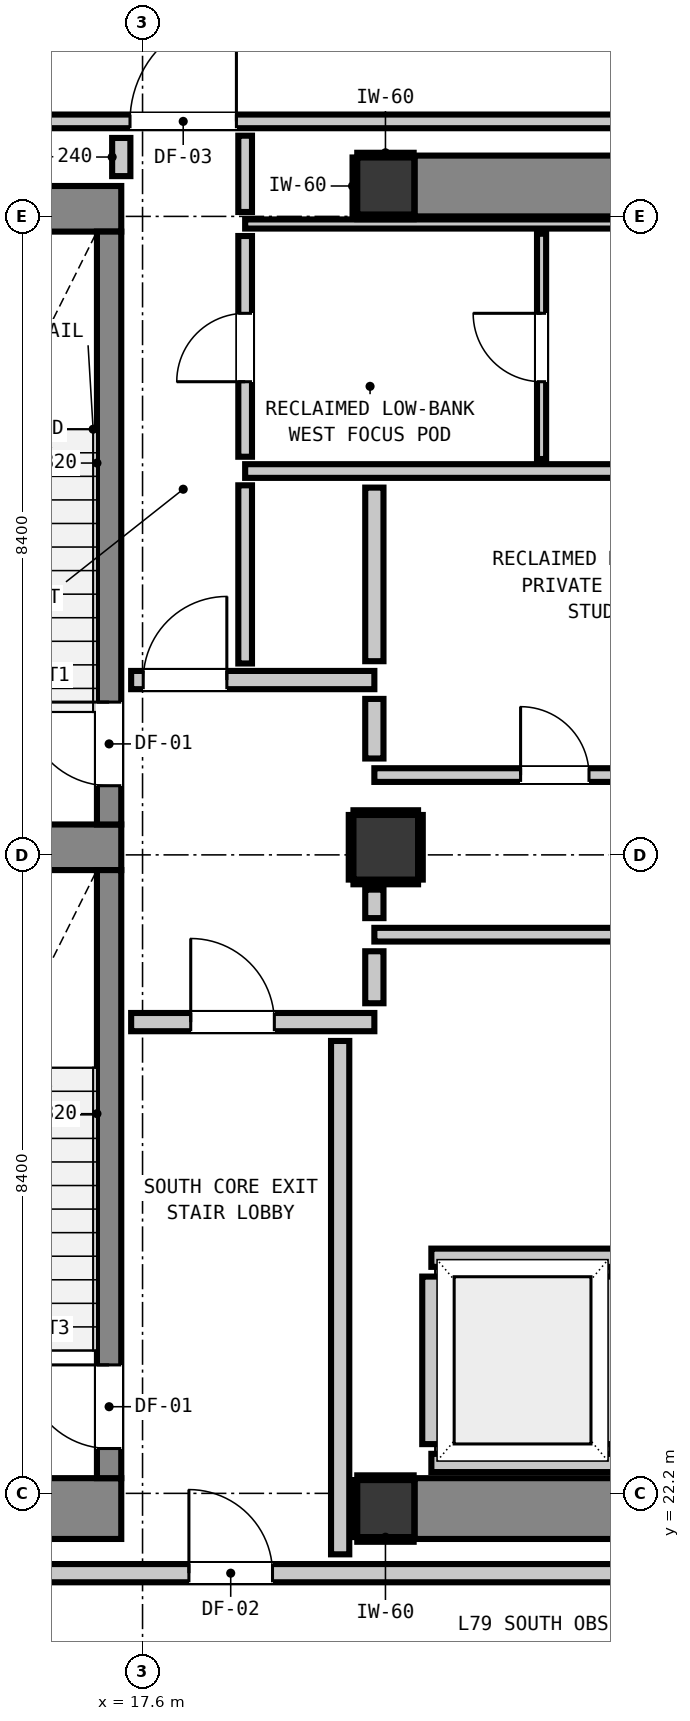
"""IFC4 building model, lengths in metres.
Left out: names, types, materials, properties, quantities, classifications, styles, units other than length and angle.
Written with IfcOpenShell. Run it as: python <this file> out.ifc"""

import sys

from ifc_helpers import new_model, si_unit, direction, frame, frame_2d, origin, origin_2d, place, context, subcontext, project, spatial, rectangle, extrude, element, fill, save


model = new_model("IFC4")
c1 = context("Model", 3, precision=1e-05, world=origin(), true_north=direction((0.0, 1.0)))
c2 = subcontext(c1, "Body", "Model", "MODEL_VIEW")
j1 = project(units=[si_unit("LENGTHUNIT", "METRE"), si_unit("PLANEANGLEUNIT", "RADIAN")], contexts=[c1])
p1 = place(None, origin())
s1 = spatial("IfcSite", under=j1, at=p1, CompositionType="ELEMENT")
p2 = place(p1, origin())
s2 = spatial("IfcBuilding", under=s1, at=p2, CompositionType="ELEMENT")
p3 = place(p2, frame((0.0, 0.0, 273.48)))
s3 = spatial("IfcBuildingStorey", under=s2, at=p3, CompositionType="ELEMENT", Elevation=273.48)
for number, where, z_axis, x_axis in (
    (1, (20.8, 22.0, 0.0), (0.0, 0.0, 1.0), (1.0, 0.0, 0.0)),
    (2, (20.8, 39.4, 0.0), (0.0, 0.0, 1.0), (1.0, 0.0, 0.0)),
):
    element("IfcColumn", number, at=place(p3, frame(where, z_axis=z_axis, x_axis=x_axis)), inside=s3, PredefinedType="COLUMN", context=c2, shape_type="SweptSolid", body=[
        extrude(rectangle(XDim=0.75, YDim=0.75, at=origin_2d()), origin(), (0.0, 0.0, 1.0), 4.18),
    ])
p4 = place(p3, frame((13.24, 22.0, 0.0), z_axis=(0.0, 0.0, 1.0), x_axis=(1.0, 0.0, 0.0)))
e3 = element("IfcWall", 3, at=p4, inside=s3, PredefinedType="SHEAR", context=c2, shape_type="SweptSolid", body=[
    extrude(rectangle(XDim=4.08, YDim=0.8, at=frame_2d((2.04, 0.0))), origin(), (0.0, 0.0, 1.0), 4.6),
])
p5 = place(p3, frame((13.24, 39.1, 0.0), z_axis=(0.0, 0.0, 1.0), x_axis=(1.0, 0.0, 0.0)))
e4 = element("IfcWall", 4, at=p5, inside=s3, PredefinedType="SHEAR", context=c2, shape_type="SweptSolid", body=[
    extrude(rectangle(XDim=4.08, YDim=0.6, at=frame_2d((2.04, 0.0))), origin(), (0.0, 0.0, 1.0), 4.6),
])
p6 = place(p3, frame((13.78, 30.7, 0.0), z_axis=(0.0, 0.0, 1.0), x_axis=(1.0, 0.0, 0.0)))
e5 = element("IfcWall", 5, at=p6, inside=s3, PredefinedType="SHEAR", context=c2, shape_type="SweptSolid", body=[
    extrude(rectangle(XDim=3.54, YDim=0.6, at=frame_2d((1.77, 0.0))), origin(), (0.0, 0.0, 1.0), 4.6),
])
for number, where, z_axis, x_axis in (
    (6, (21.18, 22.0, 0.0), (0.0, 0.0, 1.0), (1.0, 0.0, 0.0)),
    (7, (21.18, 39.4, 0.0), (0.0, 0.0, 1.0), (1.0, 0.0, 0.0)),
):
    element("IfcWall", number, at=place(p3, frame(where, z_axis=z_axis, x_axis=x_axis)), inside=s3, PredefinedType="SHEAR", context=c2, shape_type="SweptSolid", body=[
        extrude(rectangle(XDim=7.64, YDim=0.8, at=frame_2d((3.82, 0.0))), origin(), (0.0, 0.0, 1.0), 4.6),
    ])
p7 = place(p3, frame((17.16, 31.0, 0.0), z_axis=(0.0, 0.0, 1.0), x_axis=(0.0, 1.0, 0.0)))
e8 = element("IfcWall", 8, at=p7, inside=s3, PredefinedType="SHEAR", context=c2, shape_type="SweptSolid", body=[
    extrude(rectangle(XDim=7.8, YDim=0.32, at=frame_2d((3.9, 0.0))), origin(), (0.0, 0.0, 1.0), 4.6),
])
p8 = place(p7, frame((0.51, 0.0, 0.0)))
e9 = element("IfcOpeningElement", 9, at=p8, cuts=e8, PredefinedType="OPENING", context=c2, shape_type="SweptSolid", body=[
    extrude(rectangle(XDim=1.1, YDim=2.15, at=frame_2d((0.55, 1.075))), frame((0.0, 0.17, 0.0), z_axis=(0.0, -1.0, 0.0), x_axis=(1.0, 0.0, 0.0)), (0.0, 0.0, 1.0), 0.34),
])
p9 = place(p3, frame((17.16, 22.4, 0.0), z_axis=(0.0, 0.0, 1.0), x_axis=(0.0, 1.0, 0.0)))
e10 = element("IfcWall", 10, at=p9, inside=s3, PredefinedType="SHEAR", context=c2, shape_type="SweptSolid", body=[
    extrude(rectangle(XDim=8.0, YDim=0.32, at=frame_2d((4.0, 0.0))), origin(), (0.0, 0.0, 1.0), 4.6),
])
p10 = place(p9, frame((0.39, 0.0, 0.0)))
e11 = element("IfcOpeningElement", 11, at=p10, cuts=e10, PredefinedType="OPENING", context=c2, shape_type="SweptSolid", body=[
    extrude(rectangle(XDim=1.1, YDim=2.15, at=frame_2d((0.55, 1.075))), frame((0.0, 0.17, 0.0), z_axis=(0.0, -1.0, 0.0), x_axis=(1.0, 0.0, 0.0)), (0.0, 0.0, 1.0), 0.34),
])
p11 = place(p3, frame((20.8, 30.7, 0.0), z_axis=(0.0, 0.0, 1.0), x_axis=(1.0, 0.0, 0.0)))
e12 = element("IfcColumn", 12, at=p11, inside=s3, PredefinedType="COLUMN", context=c2, shape_type="SweptSolid", body=[
    extrude(rectangle(XDim=0.85, YDim=0.85, at=origin_2d()), origin(), (0.0, 0.0, 1.0), 4.6),
])
p12 = place(p3, frame((21.4, 22.6, 0.0), z_axis=(0.0, 0.0, 1.0), x_axis=(1.0, 0.0, 0.0)))
e13 = element("IfcWall", 13, at=p12, inside=s3, PredefinedType="PARTITIONING", context=c2, shape_type="SweptSolid", body=[
    extrude(rectangle(XDim=2.4, YDim=0.24, at=frame_2d((1.2, 0.0))), origin(), (0.0, 0.0, 1.0), 1.965),
])
p13 = place(p3, frame((21.4, 25.3, 0.0), z_axis=(0.0, 0.0, 1.0), x_axis=(1.0, 0.0, 0.0)))
e14 = element("IfcWall", 14, at=p13, inside=s3, PredefinedType="PARTITIONING", context=c2, shape_type="SweptSolid", body=[
    extrude(rectangle(XDim=2.4, YDim=0.24, at=frame_2d((1.2, 0.0))), origin(), (0.0, 0.0, 1.0), 4.18),
])
p14 = place(p3, frame((21.4, 22.848, 0.0), z_axis=(0.0, 0.0, 1.0), x_axis=(0.0, 1.0, 0.0)))
e15 = element("IfcWall", 15, at=p14, inside=s3, PredefinedType="PARTITIONING", context=c2, shape_type="SweptSolid", body=[
    extrude(rectangle(XDim=2.204, YDim=0.24, at=frame_2d((1.102, 0.0))), origin(), (0.0, 0.0, 1.0), 1.965),
])
p15 = place(p3, frame((23.8, 22.848, 0.0), z_axis=(0.0, 0.0, 1.0), x_axis=(0.0, 1.0, 0.0)))
e16 = element("IfcWall", 16, at=p15, inside=s3, PredefinedType="PARTITIONING", context=c2, shape_type="SweptSolid", body=[
    extrude(rectangle(XDim=2.204, YDim=0.24, at=frame_2d((1.102, 0.0))), origin(), (0.0, 0.0, 1.0), 4.18),
])
p16 = place(p3, frame((4.587, 21.15, 0.0), z_axis=(0.0, 0.0, 1.0), x_axis=(1.0, 0.0, 0.0)))
e17 = element("IfcWall", 17, at=p16, inside=s3, PredefinedType="PARTITIONING", context=c2, shape_type="SweptSolid", body=[
    extrude(rectangle(XDim=36.626, YDim=0.24, at=frame_2d((18.313, 0.0))), origin(), (0.0, 0.0, 1.0), 4.18),
])
p17 = place(p16, frame((13.623, 0.0, 0.0)))
e18 = element("IfcOpeningElement", 18, at=p17, cuts=e17, PredefinedType="OPENING", context=c2, shape_type="SweptSolid", body=[
    extrude(rectangle(XDim=1.1, YDim=2.15, at=frame_2d((0.55, 1.075))), frame((0.0, 0.13, 0.0), z_axis=(0.0, -1.0, 0.0), x_axis=(1.0, 0.0, 0.0)), (0.0, 0.0, 1.0), 0.26),
])
p18 = place(p16, frame((5.863, 0.0, 0.0)))
e19 = element("IfcOpeningElement", 19, at=p18, cuts=e17, PredefinedType="OPENING", context=c2, shape_type="SweptSolid", body=[
    extrude(rectangle(XDim=1.4, YDim=2.15, at=frame_2d((0.7, 1.075))), frame((0.0, 0.13, 0.0), z_axis=(0.0, -1.0, 0.0), x_axis=(1.0, 0.0, 0.0)), (0.0, 0.0, 1.0), 0.26),
])
p19 = place(p16, frame((2.382, 0.0, 0.0)))
e20 = element("IfcOpeningElement", 20, at=p19, cuts=e17, PredefinedType="OPENING", context=c2, shape_type="SweptSolid", body=[
    extrude(rectangle(XDim=0.86, YDim=2.02, at=frame_2d((0.43, 1.01))), frame((0.0, 0.13, 0.0), z_axis=(0.0, -1.0, 0.0), x_axis=(1.0, 0.0, 0.0)), (0.0, 0.0, 1.0), 0.26),
])
p20 = place(p16, frame((34.414, 0.0, 0.0)))
e21 = element("IfcOpeningElement", 21, at=p20, cuts=e17, PredefinedType="OPENING", context=c2, shape_type="SweptSolid", body=[
    extrude(rectangle(XDim=0.9, YDim=2.1, at=frame_2d((0.45, 1.05))), frame((0.0, 0.13, 0.0), z_axis=(0.0, -1.0, 0.0), x_axis=(1.0, 0.0, 0.0)), (0.0, 0.0, 1.0), 0.26),
])
p21 = place(p3, frame((17.45, 28.4, 0.0), z_axis=(0.0, 0.0, 1.0), x_axis=(1.0, 0.0, 0.0)))
e22 = element("IfcWall", 22, at=p21, inside=s3, PredefinedType="PARTITIONING", context=c2, shape_type="SweptSolid", body=[
    extrude(rectangle(XDim=3.2, YDim=0.24, at=frame_2d((1.6, 0.0))), origin(), (0.0, 0.0, 1.0), 4.18),
])
p22 = place(p21, frame((0.784, 0.0, 0.0)))
e23 = element("IfcOpeningElement", 23, at=p22, cuts=e22, PredefinedType="OPENING", context=c2, shape_type="SweptSolid", body=[
    extrude(rectangle(XDim=1.1, YDim=2.15, at=frame_2d((0.55, 1.075))), frame((0.0, 0.13, 0.0), z_axis=(0.0, -1.0, 0.0), x_axis=(1.0, 0.0, 0.0)), (0.0, 0.0, 1.0), 0.26),
])
p23 = place(p3, frame((17.45, 32.9, 0.0), z_axis=(0.0, 0.0, 1.0), x_axis=(1.0, 0.0, 0.0)))
e24 = element("IfcWall", 24, at=p23, inside=s3, PredefinedType="PARTITIONING", context=c2, shape_type="SweptSolid", body=[
    extrude(rectangle(XDim=3.2, YDim=0.24, at=frame_2d((1.6, 0.0))), origin(), (0.0, 0.0, 1.0), 4.18),
])
p24 = place(p23, frame((0.159, 0.0, 0.0)))
e25 = element("IfcOpeningElement", 25, at=p24, cuts=e24, PredefinedType="OPENING", context=c2, shape_type="SweptSolid", body=[
    extrude(rectangle(XDim=1.1, YDim=2.15, at=frame_2d((0.55, 1.075))), frame((0.0, 0.13, 0.0), z_axis=(0.0, -1.0, 0.0), x_axis=(1.0, 0.0, 0.0)), (0.0, 0.0, 1.0), 0.26),
])
p25 = place(p3, frame((20.65, 29.55, 0.0), z_axis=(0.0, 0.0, 1.0), x_axis=(1.0, 0.0, 0.0)))
e26 = element("IfcWall", 26, at=p25, inside=s3, PredefinedType="PARTITIONING", context=c2, shape_type="SweptSolid", body=[
    extrude(rectangle(XDim=9.325, YDim=0.18, at=frame_2d((4.663, 0.0))), origin(), (0.0, 0.0, 1.0), 4.18),
])
p26 = place(p3, frame((20.65, 31.65, 0.0), z_axis=(0.0, 0.0, 1.0), x_axis=(1.0, 0.0, 0.0)))
e27 = element("IfcWall", 27, at=p26, inside=s3, PredefinedType="PARTITIONING", context=c2, shape_type="SweptSolid", body=[
    extrude(rectangle(XDim=7.7, YDim=0.18, at=frame_2d((3.85, 0.0))), origin(), (0.0, 0.0, 1.0), 4.18),
])
p27 = place(p26, frame((1.924, 0.0, 0.0)))
e28 = element("IfcOpeningElement", 28, at=p27, cuts=e27, PredefinedType="OPENING", context=c2, shape_type="SweptSolid", body=[
    extrude(rectangle(XDim=0.9, YDim=2.1, at=frame_2d((0.45, 1.05))), frame((0.0, 0.1, 0.0), z_axis=(0.0, -1.0, 0.0), x_axis=(1.0, 0.0, 0.0)), (0.0, 0.0, 1.0), 0.2),
])
p28 = place(p3, frame((18.95, 35.65, 0.0), z_axis=(0.0, 0.0, 1.0), x_axis=(1.0, 0.0, 0.0)))
e29 = element("IfcWall", 29, at=p28, inside=s3, PredefinedType="PARTITIONING", context=c2, shape_type="SweptSolid", body=[
    extrude(rectangle(XDim=11.025, YDim=0.18, at=frame_2d((5.513, 0.0))), origin(), (0.0, 0.0, 1.0), 4.18),
])
p29 = place(p3, frame((4.587, 40.25, 0.0), z_axis=(0.0, 0.0, 1.0), x_axis=(1.0, 0.0, 0.0)))
e30 = element("IfcWall", 30, at=p29, inside=s3, PredefinedType="PARTITIONING", context=c2, shape_type="SweptSolid", body=[
    extrude(rectangle(XDim=36.626, YDim=0.18, at=frame_2d((18.313, 0.0))), origin(), (0.0, 0.0, 1.0), 4.18),
])
p30 = place(p29, frame((12.848, 0.0, 0.0)))
e31 = element("IfcOpeningElement", 31, at=p30, cuts=e30, PredefinedType="OPENING", context=c2, shape_type="SweptSolid", body=[
    extrude(rectangle(XDim=1.4, YDim=2.15, at=frame_2d((0.7, 1.075))), frame((0.0, 0.1, 0.0), z_axis=(0.0, -1.0, 0.0), x_axis=(1.0, 0.0, 0.0)), (0.0, 0.0, 1.0), 0.2),
])
p31 = place(p29, frame((5.863, 0.0, 0.0)))
e32 = element("IfcOpeningElement", 32, at=p31, cuts=e30, PredefinedType="OPENING", context=c2, shape_type="SweptSolid", body=[
    extrude(rectangle(XDim=1.4, YDim=2.15, at=frame_2d((0.7, 1.075))), frame((0.0, 0.1, 0.0), z_axis=(0.0, -1.0, 0.0), x_axis=(1.0, 0.0, 0.0)), (0.0, 0.0, 1.0), 0.2),
])
p32 = place(p29, frame((2.362, 0.0, 0.0)))
e33 = element("IfcOpeningElement", 33, at=p32, cuts=e30, PredefinedType="OPENING", context=c2, shape_type="SweptSolid", body=[
    extrude(rectangle(XDim=0.9, YDim=2.1, at=frame_2d((0.45, 1.05))), frame((0.0, 0.1, 0.0), z_axis=(0.0, -1.0, 0.0), x_axis=(1.0, 0.0, 0.0)), (0.0, 0.0, 1.0), 0.2),
])
p33 = place(p29, frame((34.414, 0.0, 0.0)))
e34 = element("IfcOpeningElement", 34, at=p33, cuts=e30, PredefinedType="OPENING", context=c2, shape_type="SweptSolid", body=[
    extrude(rectangle(XDim=0.9, YDim=2.1, at=frame_2d((0.45, 1.05))), frame((0.0, 0.1, 0.0), z_axis=(0.0, -1.0, 0.0), x_axis=(1.0, 0.0, 0.0)), (0.0, 0.0, 1.0), 0.2),
])
p34 = place(p3, frame((18.95, 38.9, 0.0), z_axis=(0.0, 0.0, 1.0), x_axis=(1.0, 0.0, 0.0)))
e35 = element("IfcWall", 35, at=p34, inside=s3, PredefinedType="PARTITIONING", context=c2, shape_type="SweptSolid", body=[
    extrude(rectangle(XDim=11.025, YDim=0.12, at=frame_2d((5.513, 0.0))), origin(), (0.0, 0.0, 1.0), 1.965),
])
p35 = place(p3, frame((17.32, 39.53, 0.0), z_axis=(0.0, 0.0, 1.0), x_axis=(0.0, 1.0, 0.0)))
e36 = element("IfcWall", 36, at=p35, inside=s3, PredefinedType="PARTITIONING", context=c2, shape_type="SweptSolid", body=[
    extrude(rectangle(XDim=0.502, YDim=0.24, at=frame_2d((0.251, 0.0))), origin(), (0.0, 0.0, 1.0), 4.18),
])
p36 = place(p3, frame((20.2, 21.398, 0.0), z_axis=(0.0, 0.0, 1.0), x_axis=(0.0, 1.0, 0.0)))
e37 = element("IfcWall", 37, at=p36, inside=s3, PredefinedType="PARTITIONING", context=c2, shape_type="SweptSolid", body=[
    extrude(rectangle(XDim=6.754, YDim=0.24, at=frame_2d((3.377, 0.0))), origin(), (0.0, 0.0, 1.0), 1.965),
])
p37 = place(p3, frame((20.65, 28.648, 0.0), z_axis=(0.0, 0.0, 1.0), x_axis=(0.0, 1.0, 0.0)))
e38 = element("IfcWall", 38, at=p37, inside=s3, PredefinedType="PARTITIONING", context=c2, shape_type="SweptSolid", body=[
    extrude(rectangle(XDim=0.684, YDim=0.24, at=frame_2d((0.342, 0.0))), origin(), (0.0, 0.0, 1.0), 1.965),
])
p38 = place(p3, frame((20.65, 29.768, 0.0), z_axis=(0.0, 0.0, 1.0), x_axis=(0.0, 1.0, 0.0)))
e39 = element("IfcWall", 39, at=p38, inside=s3, PredefinedType="PARTITIONING", context=c2, shape_type="SweptSolid", body=[
    extrude(rectangle(XDim=0.375, YDim=0.24, at=frame_2d((0.188, 0.0))), origin(), (0.0, 0.0, 1.0), 1.965),
])
p39 = place(p3, frame((20.65, 31.868, 0.0), z_axis=(0.0, 0.0, 1.0), x_axis=(0.0, 1.0, 0.0)))
e40 = element("IfcWall", 40, at=p39, inside=s3, PredefinedType="PARTITIONING", context=c2, shape_type="SweptSolid", body=[
    extrude(rectangle(XDim=0.784, YDim=0.24, at=frame_2d((0.392, 0.0))), origin(), (0.0, 0.0, 1.0), 1.965),
])
p40 = place(p3, frame((20.65, 33.148, 0.0), z_axis=(0.0, 0.0, 1.0), x_axis=(0.0, 1.0, 0.0)))
e41 = element("IfcWall", 41, at=p40, inside=s3, PredefinedType="PARTITIONING", context=c2, shape_type="SweptSolid", body=[
    extrude(rectangle(XDim=2.284, YDim=0.24, at=frame_2d((1.142, 0.0))), origin(), (0.0, 0.0, 1.0), 1.965),
])
p41 = place(p3, frame((18.95, 33.118, 0.0), z_axis=(0.0, 0.0, 1.0), x_axis=(0.0, 1.0, 0.0)))
e42 = element("IfcWall", 42, at=p41, inside=s3, PredefinedType="PARTITIONING", context=c2, shape_type="SweptSolid", body=[
    extrude(rectangle(XDim=2.344, YDim=0.18, at=frame_2d((1.172, 0.0))), origin(), (0.0, 0.0, 1.0), 4.18),
])
p42 = place(p3, frame((18.95, 35.838, 0.0), z_axis=(0.0, 0.0, 1.0), x_axis=(0.0, 1.0, 0.0)))
e43 = element("IfcWall", 43, at=p42, inside=s3, PredefinedType="PARTITIONING", context=c2, shape_type="SweptSolid", body=[
    extrude(rectangle(XDim=2.904, YDim=0.18, at=frame_2d((1.452, 0.0))), origin(), (0.0, 0.0, 1.0), 4.18),
])
p43 = place(p42, frame((0.987, 0.0, 0.0)))
e44 = element("IfcOpeningElement", 44, at=p43, cuts=e43, PredefinedType="OPENING", context=c2, shape_type="SweptSolid", body=[
    extrude(rectangle(XDim=0.9, YDim=2.1, at=frame_2d((0.45, 1.05))), frame((0.0, 0.1, 0.0), z_axis=(0.0, -1.0, 0.0), x_axis=(1.0, 0.0, 0.0)), (0.0, 0.0, 1.0), 0.2),
])
p44 = place(p3, frame((18.95, 39.058, 0.0), z_axis=(0.0, 0.0, 1.0), x_axis=(0.0, 1.0, 0.0)))
e45 = element("IfcWall", 45, at=p44, inside=s3, PredefinedType="PARTITIONING", context=c2, shape_type="SweptSolid", body=[
    extrude(rectangle(XDim=1.004, YDim=0.18, at=frame_2d((0.502, 0.0))), origin(), (0.0, 0.0, 1.0), 4.18),
])
p45 = place(p3, frame((22.85, 35.808, 0.0), z_axis=(0.0, 0.0, 1.0), x_axis=(0.0, 1.0, 0.0)))
e46 = element("IfcWall", 46, at=p45, inside=s3, PredefinedType="PARTITIONING", context=c2, shape_type="SweptSolid", body=[
    extrude(rectangle(XDim=2.964, YDim=0.12, at=frame_2d((1.482, 0.0))), origin(), (0.0, 0.0, 1.0), 4.18),
])
p46 = place(p45, frame((1.017, 0.0, 0.0)))
e47 = element("IfcOpeningElement", 47, at=p46, cuts=e46, PredefinedType="OPENING", context=c2, shape_type="SweptSolid", body=[
    extrude(rectangle(XDim=0.9, YDim=2.1, at=frame_2d((0.45, 1.05))), frame((0.0, 0.07, 0.0), z_axis=(0.0, -1.0, 0.0), x_axis=(1.0, 0.0, 0.0)), (0.0, 0.0, 1.0), 0.14),
])
for number, where, z_axis, x_axis in (
    (48, (20.425, 21.593, 0.0), (0.0, 0.0, 1.0), (1.0, 0.0, 0.0)),
    (49, (20.425, 22.407, 0.0), (0.0, 0.0, 1.0), (1.0, 0.0, 0.0)),
):
    element("IfcWall", number, at=place(p3, frame(where, z_axis=z_axis, x_axis=x_axis)), inside=s3, PredefinedType="PARTITIONING", context=c2, shape_type="SweptSolid", body=[
        extrude(rectangle(XDim=0.742, YDim=0.06, at=frame_2d((0.371, 0.0))), origin(), (0.0, 0.0, 1.0), 1.45),
    ])
p47 = place(p3, frame((20.393, 21.625, 0.0), z_axis=(0.0, 0.0, 1.0), x_axis=(0.0, 1.0, 0.0)))
e50 = element("IfcWall", 50, at=p47, inside=s3, PredefinedType="PARTITIONING", context=c2, shape_type="SweptSolid", body=[
    extrude(rectangle(XDim=0.75, YDim=0.06, at=frame_2d((0.375, 0.0))), origin(), (0.0, 0.0, 1.0), 1.45),
])
for number, where, z_axis, x_axis in (
    (51, (20.425, 38.993, 0.0), (0.0, 0.0, 1.0), (1.0, 0.0, 0.0)),
    (52, (20.425, 39.807, 0.0), (0.0, 0.0, 1.0), (1.0, 0.0, 0.0)),
):
    element("IfcWall", number, at=place(p3, frame(where, z_axis=z_axis, x_axis=x_axis)), inside=s3, PredefinedType="PARTITIONING", context=c2, shape_type="SweptSolid", body=[
        extrude(rectangle(XDim=0.742, YDim=0.06, at=frame_2d((0.371, 0.0))), origin(), (0.0, 0.0, 1.0), 1.45),
    ])
p48 = place(p3, frame((20.393, 39.025, 0.0), z_axis=(0.0, 0.0, 1.0), x_axis=(0.0, 1.0, 0.0)))
e53 = element("IfcWall", 53, at=p48, inside=s3, PredefinedType="PARTITIONING", context=c2, shape_type="SweptSolid", body=[
    extrude(rectangle(XDim=0.75, YDim=0.06, at=frame_2d((0.375, 0.0))), origin(), (0.0, 0.0, 1.0), 1.45),
])
for number, where, z_axis, x_axis in (
    (54, (20.375, 30.243, 0.0), (0.0, 0.0, 1.0), (1.0, 0.0, 0.0)),
    (55, (20.375, 31.157, 0.0), (0.0, 0.0, 1.0), (1.0, 0.0, 0.0)),
    (56, (20.343, 30.275, 0.0), (0.0, 0.0, 1.0), (0.0, 1.0, 0.0)),
    (57, (21.257, 30.275, 0.0), (0.0, 0.0, 1.0), (0.0, 1.0, 0.0)),
):
    element("IfcWall", number, at=place(p3, frame(where, z_axis=z_axis, x_axis=x_axis)), inside=s3, PredefinedType="PARTITIONING", context=c2, shape_type="SweptSolid", body=[
        extrude(rectangle(XDim=0.85, YDim=0.06, at=frame_2d((0.425, 0.0))), origin(), (0.0, 0.0, 1.0), 1.45),
    ])
p49 = place(p8, origin())
e58 = element("IfcDoor", 58, at=p49, inside=s3, OperationType="SINGLE_SWING_RIGHT", PredefinedType="DOOR", context=c2, shape_type="SweptSolid", body=[
    extrude(rectangle(XDim=1.1, YDim=2.15, at=frame_2d((0.55, 1.075))), frame((0.0, 0.025, 0.0), z_axis=(0.0, -1.0, 0.0), x_axis=(1.0, 0.0, 0.0)), (0.0, 0.0, 1.0), 0.05),
])
fill(e9, e58)
p50 = place(p10, origin())
e59 = element("IfcDoor", 59, at=p50, inside=s3, OperationType="SINGLE_SWING_RIGHT", PredefinedType="DOOR", context=c2, shape_type="SweptSolid", body=[
    extrude(rectangle(XDim=1.1, YDim=2.15, at=frame_2d((0.55, 1.075))), frame((0.0, 0.025, 0.0), z_axis=(0.0, -1.0, 0.0), x_axis=(1.0, 0.0, 0.0)), (0.0, 0.0, 1.0), 0.05),
])
fill(e11, e59)
p51 = place(p22, origin())
e60 = element("IfcDoor", 60, at=p51, inside=s3, OperationType="SINGLE_SWING_LEFT", PredefinedType="DOOR", context=c2, shape_type="SweptSolid", body=[
    extrude(rectangle(XDim=1.1, YDim=2.15, at=frame_2d((0.55, 1.075))), frame((0.0, 0.025, 0.0), z_axis=(0.0, -1.0, 0.0), x_axis=(1.0, 0.0, 0.0)), (0.0, 0.0, 1.0), 0.05),
])
fill(e23, e60)
p52 = place(p24, origin())
e61 = element("IfcDoor", 61, at=p52, inside=s3, OperationType="SINGLE_SWING_RIGHT", PredefinedType="DOOR", context=c2, shape_type="SweptSolid", body=[
    extrude(rectangle(XDim=1.1, YDim=2.15, at=frame_2d((0.55, 1.075))), frame((0.0, 0.025, 0.0), z_axis=(0.0, -1.0, 0.0), x_axis=(1.0, 0.0, 0.0)), (0.0, 0.0, 1.0), 0.05),
])
fill(e25, e61)
p53 = place(p17, origin())
e62 = element("IfcDoor", 62, at=p53, inside=s3, OperationType="SINGLE_SWING_LEFT", PredefinedType="DOOR", context=c2, shape_type="SweptSolid", body=[
    extrude(rectangle(XDim=1.1, YDim=2.15, at=frame_2d((0.55, 1.075))), frame((0.0, 0.025, 0.0), z_axis=(0.0, -1.0, 0.0), x_axis=(1.0, 0.0, 0.0)), (0.0, 0.0, 1.0), 0.05),
])
fill(e18, e62)
p54 = place(p30, origin())
e63 = element("IfcDoor", 63, at=p54, inside=s3, OperationType="SINGLE_SWING_RIGHT", PredefinedType="DOOR", context=c2, shape_type="SweptSolid", body=[
    extrude(rectangle(XDim=1.4, YDim=2.15, at=frame_2d((0.7, 1.075))), frame((0.0, 0.025, 0.0), z_axis=(0.0, -1.0, 0.0), x_axis=(1.0, 0.0, 0.0)), (0.0, 0.0, 1.0), 0.05),
])
fill(e31, e63)
p55 = place(p43, origin())
e64 = element("IfcDoor", 64, at=p55, inside=s3, OperationType="SINGLE_SWING_LEFT", PredefinedType="DOOR", context=c2, shape_type="SweptSolid", body=[
    extrude(rectangle(XDim=0.9, YDim=2.1, at=frame_2d((0.45, 1.05))), frame((0.0, 0.025, 0.0), z_axis=(0.0, -1.0, 0.0), x_axis=(1.0, 0.0, 0.0)), (0.0, 0.0, 1.0), 0.05),
])
fill(e44, e64)
p56 = place(p46, origin())
e65 = element("IfcDoor", 65, at=p56, inside=s3, OperationType="SINGLE_SWING_RIGHT", PredefinedType="DOOR", context=c2, shape_type="SweptSolid", body=[
    extrude(rectangle(XDim=0.9, YDim=2.1, at=frame_2d((0.45, 1.05))), frame((0.0, 0.025, 0.0), z_axis=(0.0, -1.0, 0.0), x_axis=(1.0, 0.0, 0.0)), (0.0, 0.0, 1.0), 0.05),
])
fill(e47, e65)
p57 = place(p27, origin())
e66 = element("IfcDoor", 66, at=p57, inside=s3, OperationType="SINGLE_SWING_LEFT", PredefinedType="DOOR", context=c2, shape_type="SweptSolid", body=[
    extrude(rectangle(XDim=0.9, YDim=2.1, at=frame_2d((0.45, 1.05))), frame((0.0, 0.025, 0.0), z_axis=(0.0, -1.0, 0.0), x_axis=(1.0, 0.0, 0.0)), (0.0, 0.0, 1.0), 0.05),
])
fill(e28, e66)
save(model, sys.argv[1])
